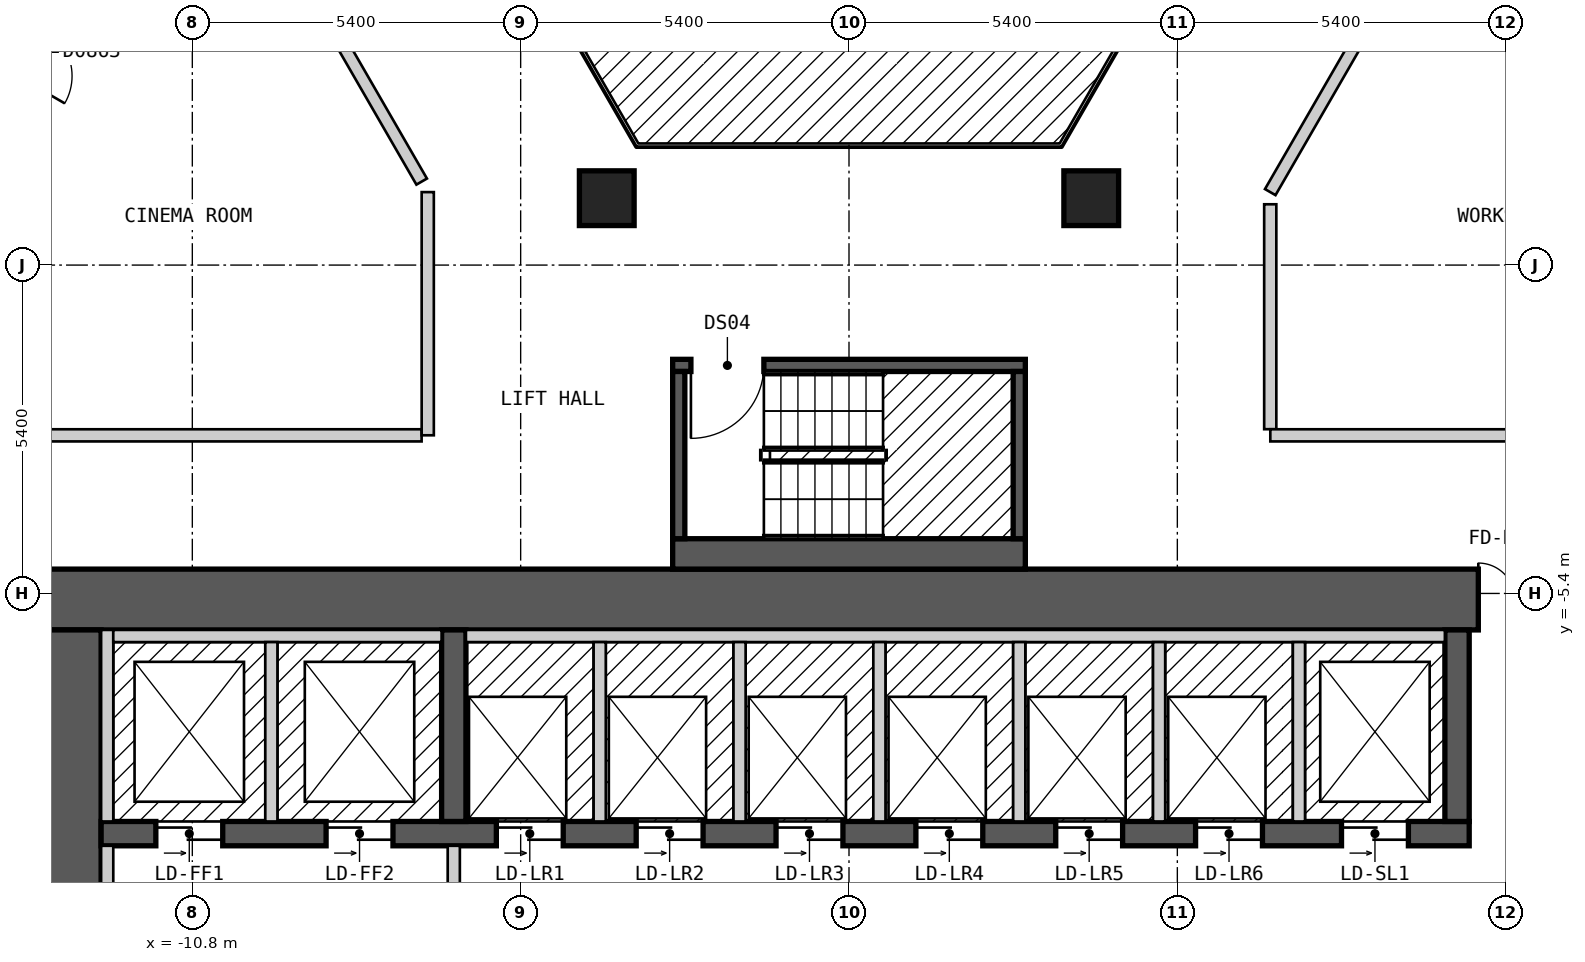
"""IFC4 building model, lengths in metres.
Left out: names, types, materials, properties, quantities, classifications, styles, units other than length and angle.
Written with IfcOpenShell. Run it as: python <this file> out.ifc"""

import sys

from ifc_helpers import new_model, si_unit, direction, frame, frame_2d, origin, origin_2d, place, context, subcontext, project, spatial, rectangle, extrude, element, fill, save


model = new_model("IFC4")
c1 = context("Model", 3, precision=1e-05, world=origin(), true_north=direction((0.0, 1.0)))
c2 = subcontext(c1, "Body", "Model", "MODEL_VIEW")
j1 = project(units=[si_unit("LENGTHUNIT", "METRE"), si_unit("PLANEANGLEUNIT", "RADIAN")], contexts=[c1])
p1 = place(None, origin())
s1 = spatial("IfcSite", under=j1, at=p1, CompositionType="ELEMENT")
p2 = place(p1, origin())
s2 = spatial("IfcBuilding", under=s1, at=p2, CompositionType="ELEMENT")
p3 = place(p2, frame((0.0, 0.0, 84.0)))
s3 = spatial("IfcBuildingStorey", under=s2, at=p3, CompositionType="ELEMENT", Elevation=84.0)
for number, where, z_axis, x_axis in (
    (1, (3.984, 1.1, 0.0), (0.0, 0.0, 1.0), (1.0, 0.0, 0.0)),
    (2, (-3.984, 1.1, 0.0), (0.0, 0.0, 1.0), (1.0, 0.0, 0.0)),
):
    element("IfcColumn", number, at=place(p3, frame(where, z_axis=z_axis, x_axis=x_axis)), inside=s3, PredefinedType="COLUMN", context=c2, shape_type="SweptSolid", body=[
        extrude(rectangle(XDim=0.9, YDim=0.9, at=origin_2d()), origin(), (0.0, 0.0, 1.0), 3.0),
    ])
p4 = place(p3, frame((-13.3, -5.5, 0.0), z_axis=(0.0, 0.0, 1.0), x_axis=(1.0, 0.0, 0.0)))
e3 = element("IfcWall", 3, at=p4, inside=s3, PredefinedType="SHEAR", context=c2, shape_type="SweptSolid", body=[
    extrude(rectangle(XDim=26.6, YDim=1.0, at=frame_2d((13.3, 0.0))), origin(), (0.0, 0.0, 1.0), 2.7),
])
p5 = place(p4, frame((23.65, 0.0, 0.0)))
e4 = element("IfcOpeningElement", 4, at=p5, cuts=e3, PredefinedType="OPENING", context=c2, shape_type="SweptSolid", body=[
    extrude(rectangle(XDim=1.2, YDim=2.1, at=frame_2d((0.6, 1.05))), frame((0.0, 0.51, 0.0), z_axis=(0.0, -1.0, 0.0), x_axis=(1.0, 0.0, 0.0)), (0.0, 0.0, 1.0), 1.02),
])
p6 = place(p3, frame((-12.8, -18.0, 0.0), z_axis=(0.0, 0.0, 1.0), x_axis=(0.0, 1.0, 0.0)))
e5 = element("IfcWall", 5, at=p6, inside=s3, PredefinedType="SHEAR", context=c2, shape_type="SweptSolid", body=[
    extrude(rectangle(XDim=12.0, YDim=1.0, at=frame_2d((6.0, 0.0))), origin(), (0.0, 0.0, 1.0), 2.7),
])
p7 = place(p6, frame((3.8, 0.0, 0.0)))
e6 = element("IfcOpeningElement", 6, at=p7, cuts=e5, PredefinedType="OPENING", context=c2, shape_type="SweptSolid", body=[
    extrude(rectangle(XDim=1.2, YDim=2.1, at=frame_2d((0.6, 1.05))), frame((0.0, 0.51, 0.0), z_axis=(0.0, -1.0, 0.0), x_axis=(1.0, 0.0, 0.0)), (0.0, 0.0, 1.0), 1.02),
])
p8 = place(p3, frame((-12.3, -9.35, 0.0), z_axis=(0.0, 0.0, 1.0), x_axis=(1.0, 0.0, 0.0)))
e7 = element("IfcWall", 7, at=p8, inside=s3, PredefinedType="SHEAR", context=c2, shape_type="SweptSolid", body=[
    extrude(rectangle(XDim=22.5, YDim=0.4, at=frame_2d((11.25, 0.0))), origin(), (0.0, 0.0, 1.0), 2.7),
])
p9 = place(p8, frame((0.9, 0.0, 0.0)))
e8 = element("IfcOpeningElement", 8, at=p9, cuts=e7, PredefinedType="OPENING", context=c2, shape_type="SweptSolid", body=[
    extrude(rectangle(XDim=1.1, YDim=2.1, at=frame_2d((0.55, 1.05))), frame((0.0, 0.21, 0.0), z_axis=(0.0, -1.0, 0.0), x_axis=(1.0, 0.0, 0.0)), (0.0, 0.0, 1.0), 0.42),
])
p10 = place(p8, frame((3.7, 0.0, 0.0)))
e9 = element("IfcOpeningElement", 9, at=p10, cuts=e7, PredefinedType="OPENING", context=c2, shape_type="SweptSolid", body=[
    extrude(rectangle(XDim=1.1, YDim=2.1, at=frame_2d((0.55, 1.05))), frame((0.0, 0.21, 0.0), z_axis=(0.0, -1.0, 0.0), x_axis=(1.0, 0.0, 0.0)), (0.0, 0.0, 1.0), 0.42),
])
p11 = place(p8, frame((6.5, 0.0, 0.0)))
e10 = element("IfcOpeningElement", 10, at=p11, cuts=e7, PredefinedType="OPENING", context=c2, shape_type="SweptSolid", body=[
    extrude(rectangle(XDim=1.1, YDim=2.1, at=frame_2d((0.55, 1.05))), frame((0.0, 0.21, 0.0), z_axis=(0.0, -1.0, 0.0), x_axis=(1.0, 0.0, 0.0)), (0.0, 0.0, 1.0), 0.42),
])
p12 = place(p8, frame((8.8, 0.0, 0.0)))
e11 = element("IfcOpeningElement", 11, at=p12, cuts=e7, PredefinedType="OPENING", context=c2, shape_type="SweptSolid", body=[
    extrude(rectangle(XDim=1.1, YDim=2.1, at=frame_2d((0.55, 1.05))), frame((0.0, 0.21, 0.0), z_axis=(0.0, -1.0, 0.0), x_axis=(1.0, 0.0, 0.0)), (0.0, 0.0, 1.0), 0.42),
])
p13 = place(p8, frame((11.1, 0.0, 0.0)))
e12 = element("IfcOpeningElement", 12, at=p13, cuts=e7, PredefinedType="OPENING", context=c2, shape_type="SweptSolid", body=[
    extrude(rectangle(XDim=1.1, YDim=2.1, at=frame_2d((0.55, 1.05))), frame((0.0, 0.21, 0.0), z_axis=(0.0, -1.0, 0.0), x_axis=(1.0, 0.0, 0.0)), (0.0, 0.0, 1.0), 0.42),
])
p14 = place(p8, frame((13.4, 0.0, 0.0)))
e13 = element("IfcOpeningElement", 13, at=p14, cuts=e7, PredefinedType="OPENING", context=c2, shape_type="SweptSolid", body=[
    extrude(rectangle(XDim=1.1, YDim=2.1, at=frame_2d((0.55, 1.05))), frame((0.0, 0.21, 0.0), z_axis=(0.0, -1.0, 0.0), x_axis=(1.0, 0.0, 0.0)), (0.0, 0.0, 1.0), 0.42),
])
p15 = place(p8, frame((15.7, 0.0, 0.0)))
e14 = element("IfcOpeningElement", 14, at=p15, cuts=e7, PredefinedType="OPENING", context=c2, shape_type="SweptSolid", body=[
    extrude(rectangle(XDim=1.1, YDim=2.1, at=frame_2d((0.55, 1.05))), frame((0.0, 0.21, 0.0), z_axis=(0.0, -1.0, 0.0), x_axis=(1.0, 0.0, 0.0)), (0.0, 0.0, 1.0), 0.42),
])
p16 = place(p8, frame((18.0, 0.0, 0.0)))
e15 = element("IfcOpeningElement", 15, at=p16, cuts=e7, PredefinedType="OPENING", context=c2, shape_type="SweptSolid", body=[
    extrude(rectangle(XDim=1.1, YDim=2.1, at=frame_2d((0.55, 1.05))), frame((0.0, 0.21, 0.0), z_axis=(0.0, -1.0, 0.0), x_axis=(1.0, 0.0, 0.0)), (0.0, 0.0, 1.0), 0.42),
])
p17 = place(p8, frame((20.4, 0.0, 0.0)))
e16 = element("IfcOpeningElement", 16, at=p17, cuts=e7, PredefinedType="OPENING", context=c2, shape_type="SweptSolid", body=[
    extrude(rectangle(XDim=1.1, YDim=2.1, at=frame_2d((0.55, 1.05))), frame((0.0, 0.21, 0.0), z_axis=(0.0, -1.0, 0.0), x_axis=(1.0, 0.0, 0.0)), (0.0, 0.0, 1.0), 0.42),
])
for number, where, z_axis, x_axis in (
    (17, (-6.5, -9.15, 0.0), (0.0, 0.0, 1.0), (0.0, 1.0, 0.0)),
    (18, (10.0, -9.15, 0.0), (0.0, 0.0, 1.0), (0.0, 1.0, 0.0)),
):
    element("IfcWall", number, at=place(p3, frame(where, z_axis=z_axis, x_axis=x_axis)), inside=s3, PredefinedType="SHEAR", context=c2, shape_type="SweptSolid", body=[
        extrude(rectangle(XDim=3.15, YDim=0.4, at=frame_2d((1.575, 0.0))), origin(), (0.0, 0.0, 1.0), 2.7),
    ])
p18 = place(p3, frame((-2.9, -4.75, 0.0), z_axis=(0.0, 0.0, 1.0), x_axis=(1.0, 0.0, 0.0)))
e19 = element("IfcWall", 19, at=p18, inside=s3, PredefinedType="SOLIDWALL", context=c2, shape_type="SweptSolid", body=[
    extrude(rectangle(XDim=5.8, YDim=0.5, at=frame_2d((2.9, 0.0))), origin(), (0.0, 0.0, 1.0), 2.7),
])
p19 = place(p3, frame((-2.9, -1.65, 0.0), z_axis=(0.0, 0.0, 1.0), x_axis=(1.0, 0.0, 0.0)))
e20 = element("IfcWall", 20, at=p19, inside=s3, PredefinedType="SOLIDWALL", context=c2, shape_type="SweptSolid", body=[
    extrude(rectangle(XDim=5.8, YDim=0.2, at=frame_2d((2.9, 0.0))), origin(), (0.0, 0.0, 1.0), 2.7),
])
p20 = place(p19, frame((0.3, 0.0, 0.0)))
e21 = element("IfcOpeningElement", 21, at=p20, cuts=e20, PredefinedType="OPENING", context=c2, shape_type="SweptSolid", body=[
    extrude(rectangle(XDim=1.2, YDim=2.1, at=frame_2d((0.6, 1.05))), frame((0.0, 0.11, 0.0), z_axis=(0.0, -1.0, 0.0), x_axis=(1.0, 0.0, 0.0)), (0.0, 0.0, 1.0), 0.22),
])
for number, where, z_axis, x_axis in (
    (22, (-2.8, -4.5, 0.0), (0.0, 0.0, 1.0), (0.0, 1.0, 0.0)),
    (23, (2.8, -4.5, 0.0), (0.0, 0.0, 1.0), (0.0, 1.0, 0.0)),
):
    element("IfcWall", number, at=place(p3, frame(where, z_axis=z_axis, x_axis=x_axis)), inside=s3, PredefinedType="SOLIDWALL", context=c2, shape_type="SweptSolid", body=[
        extrude(rectangle(XDim=2.75, YDim=0.2, at=frame_2d((1.375, 0.0))), origin(), (0.0, 0.0, 1.0), 2.7),
    ])
p21 = place(p3, frame((-10.796, 7.899, 0.0), z_axis=(0.0, 0.0, 1.0), x_axis=(0.500010383074, -0.866019409031, 0.0)))
e24 = element("IfcWall", 24, at=p21, inside=s3, PredefinedType="PARTITIONING", context=c2, shape_type="SweptSolid", body=[
    extrude(rectangle(XDim=7.535, YDim=0.2, at=frame_2d((3.768, 0.0))), origin(), (0.0, 0.0, 1.0), 2.7),
])
p22 = place(p3, frame((8.488, 16.5, 0.0), z_axis=(0.0, 0.0, 1.0), x_axis=(0.499986836607, -0.86603300354, 0.0)))
e25 = element("IfcWall", 25, at=p22, inside=s3, PredefinedType="PARTITIONING", context=c2, shape_type="SweptSolid", body=[
    extrude(rectangle(XDim=20.09, YDim=0.2, at=frame_2d((10.045, 0.0))), origin(), (0.0, 0.0, 1.0), 2.7),
])
p23 = place(p22, frame((4.523, 0.0, 0.0)))
e26 = element("IfcOpeningElement", 26, at=p23, cuts=e25, PredefinedType="OPENING", context=c2, shape_type="SweptSolid", body=[
    extrude(rectangle(XDim=1.0, YDim=2.1, at=frame_2d((0.5, 1.05))), frame((0.0, 0.11, 0.0), z_axis=(0.0, -1.0, 0.0), x_axis=(1.0, 0.0, 0.0)), (0.0, 0.0, 1.0), 0.22),
])
p24 = place(p3, frame((6.928, 1.0, 0.0), z_axis=(0.0, 0.0, 1.0), x_axis=(0.0, -1.0, 0.0)))
e27 = element("IfcWall", 27, at=p24, inside=s3, PredefinedType="PARTITIONING", context=c2, shape_type="SweptSolid", body=[
    extrude(rectangle(XDim=3.699, YDim=0.2, at=frame_2d((1.85, 0.0))), origin(), (0.0, 0.0, 1.0), 2.7),
])
p25 = place(p3, frame((-15.011, -2.8, 0.0), z_axis=(0.0, 0.0, 1.0), x_axis=(1.0, 0.0, 0.0)))
e28 = element("IfcWall", 28, at=p25, inside=s3, PredefinedType="PARTITIONING", context=c2, shape_type="SweptSolid", body=[
    extrude(rectangle(XDim=7.982, YDim=0.2, at=frame_2d((3.991, 0.0))), origin(), (0.0, 0.0, 1.0), 2.7),
])
p26 = place(p3, frame((6.929, -2.8, 0.0), z_axis=(0.0, 0.0, 1.0), x_axis=(1.0, 0.0, 0.0)))
e29 = element("IfcWall", 29, at=p26, inside=s3, PredefinedType="PARTITIONING", context=c2, shape_type="SweptSolid", body=[
    extrude(rectangle(XDim=7.966, YDim=0.2, at=frame_2d((3.983, 0.0))), origin(), (0.0, 0.0, 1.0), 2.7),
])
p27 = place(p3, frame((6.928, 1.2, 0.0), z_axis=(0.0, 0.0, 1.0), x_axis=(0.500055327065, 0.865993458332, 0.0)))
e30 = element("IfcWall", 30, at=p27, inside=s3, PredefinedType="PARTITIONING", context=c2, shape_type="SweptSolid", body=[
    extrude(rectangle(XDim=7.851, YDim=0.2, at=frame_2d((3.926, 0.0))), origin(), (0.0, 0.0, 1.0), 2.7),
])
p28 = place(p3, frame((-16.05, -1.0, 0.0), z_axis=(0.0, 0.0, 1.0), x_axis=(0.499962449088, 0.866047082728, 0.0)))
e31 = element("IfcWall", 31, at=p28, inside=s3, PredefinedType="PARTITIONING", context=c2, shape_type="SweptSolid", body=[
    extrude(rectangle(XDim=10.391, YDim=0.2, at=frame_2d((5.195, 0.0))), origin(), (0.0, 0.0, 1.0), 2.7),
])
p29 = place(p28, frame((4.745, 0.0, 0.0)))
e32 = element("IfcOpeningElement", 32, at=p29, cuts=e31, PredefinedType="OPENING", context=c2, shape_type="SweptSolid", body=[
    extrude(rectangle(XDim=0.9, YDim=2.1, at=frame_2d((0.45, 1.05))), frame((0.0, 0.11, 0.0), z_axis=(0.0, -1.0, 0.0), x_axis=(1.0, 0.0, 0.0)), (0.0, 0.0, 1.0), 0.22),
])
p30 = place(p3, frame((-18.562, -0.951, 0.0), z_axis=(0.0, 0.0, 1.0), x_axis=(0.499992962407, 0.866029466902, 0.0)))
e33 = element("IfcWall", 33, at=p30, inside=s3, PredefinedType="PARTITIONING", context=c2, shape_type="SweptSolid", body=[
    extrude(rectangle(XDim=20.208, YDim=0.2, at=frame_2d((10.104, 0.0))), origin(), (0.0, 0.0, 1.0), 2.7),
])
p31 = place(p30, frame((14.627, 0.0, 0.0)))
e34 = element("IfcOpeningElement", 34, at=p31, cuts=e33, PredefinedType="OPENING", context=c2, shape_type="SweptSolid", body=[
    extrude(rectangle(XDim=1.0, YDim=2.1, at=frame_2d((0.5, 1.05))), frame((0.0, 0.11, 0.0), z_axis=(0.0, -1.0, 0.0), x_axis=(1.0, 0.0, 0.0)), (0.0, 0.0, 1.0), 0.22),
])
p32 = place(p30, frame((4.581, 0.0, 0.0)))
e35 = element("IfcOpeningElement", 35, at=p32, cuts=e33, PredefinedType="OPENING", context=c2, shape_type="SweptSolid", body=[
    extrude(rectangle(XDim=1.0, YDim=2.1, at=frame_2d((0.5, 1.05))), frame((0.0, 0.11, 0.0), z_axis=(0.0, -1.0, 0.0), x_axis=(1.0, 0.0, 0.0)), (0.0, 0.0, 1.0), 0.22),
])
p33 = place(p3, frame((-6.928, -2.799, 0.0), z_axis=(0.0, 0.0, 1.0), x_axis=(0.0, 1.0, 0.0)))
e36 = element("IfcWall", 36, at=p33, inside=s3, PredefinedType="PARTITIONING", context=c2, shape_type="SweptSolid", body=[
    extrude(rectangle(XDim=3.999, YDim=0.2, at=frame_2d((2.0, 0.0))), origin(), (0.0, 0.0, 1.0), 2.7),
])
p34 = place(p3, frame((-12.2, -13.0, 0.0), z_axis=(0.0, 0.0, 1.0), x_axis=(0.0, 1.0, 0.0)))
e37 = element("IfcWall", 37, at=p34, inside=s3, PredefinedType="PARTITIONING", context=c2, shape_type="SweptSolid", body=[
    extrude(rectangle(XDim=3.45, YDim=0.2, at=frame_2d((1.725, 0.0))), origin(), (0.0, 0.0, 1.0), 2.7),
])
p35 = place(p3, frame((-12.2, -9.15, 0.0), z_axis=(0.0, 0.0, 1.0), x_axis=(0.0, 1.0, 0.0)))
e38 = element("IfcWall", 38, at=p35, inside=s3, PredefinedType="SOLIDWALL", context=c2, shape_type="SweptSolid", body=[
    extrude(rectangle(XDim=3.15, YDim=0.2, at=frame_2d((1.575, 0.0))), origin(), (0.0, 0.0, 1.0), 2.7),
])
p36 = place(p3, frame((-12.1, -6.1, 0.0), z_axis=(0.0, 0.0, 1.0), x_axis=(1.0, 0.0, 0.0)))
e39 = element("IfcWall", 39, at=p36, inside=s3, PredefinedType="SOLIDWALL", context=c2, shape_type="SweptSolid", body=[
    extrude(rectangle(XDim=5.4, YDim=0.2, at=frame_2d((2.7, 0.0))), origin(), (0.0, 0.0, 1.0), 2.7),
])
p37 = place(p3, frame((-9.5, -9.15, 0.0), z_axis=(0.0, 0.0, 1.0), x_axis=(0.0, 1.0, 0.0)))
e40 = element("IfcWall", 40, at=p37, inside=s3, PredefinedType="SOLIDWALL", context=c2, shape_type="SweptSolid", body=[
    extrude(rectangle(XDim=2.95, YDim=0.2, at=frame_2d((1.475, 0.0))), origin(), (0.0, 0.0, 1.0), 2.7),
])
p38 = place(p3, frame((-6.5, -14.45, 0.0), z_axis=(0.0, 0.0, 1.0), x_axis=(0.0, 1.0, 0.0)))
e41 = element("IfcWall", 41, at=p38, inside=s3, PredefinedType="PARTITIONING", context=c2, shape_type="SweptSolid", body=[
    extrude(rectangle(XDim=4.9, YDim=0.2, at=frame_2d((2.45, 0.0))), origin(), (0.0, 0.0, 1.0), 2.7),
])
p39 = place(p38, frame((3.15, 0.0, 0.0), z_axis=(0.0, 0.0, 1.0), x_axis=(-1.0, 0.0, 0.0)))
e42 = element("IfcOpeningElement", 42, at=p39, cuts=e41, PredefinedType="OPENING", context=c2, shape_type="SweptSolid", body=[
    extrude(rectangle(XDim=1.4, YDim=2.1, at=frame_2d((0.7, 1.05))), frame((0.0, 0.11, 0.0), z_axis=(0.0, -1.0, 0.0), x_axis=(1.0, 0.0, 0.0)), (0.0, 0.0, 1.0), 0.22),
])
p40 = place(p3, frame((-6.3, -6.1, 0.0), z_axis=(0.0, 0.0, 1.0), x_axis=(1.0, 0.0, 0.0)))
e43 = element("IfcWall", 43, at=p40, inside=s3, PredefinedType="SOLIDWALL", context=c2, shape_type="SweptSolid", body=[
    extrude(rectangle(XDim=16.1, YDim=0.2, at=frame_2d((8.05, 0.0))), origin(), (0.0, 0.0, 1.0), 2.7),
])
for number, where, z_axis, x_axis in (
    (44, (-4.1, -9.15, 0.0), (0.0, 0.0, 1.0), (0.0, 1.0, 0.0)),
    (45, (-1.8, -9.15, 0.0), (0.0, 0.0, 1.0), (0.0, 1.0, 0.0)),
    (46, (0.5, -9.15, 0.0), (0.0, 0.0, 1.0), (0.0, 1.0, 0.0)),
    (47, (2.8, -9.15, 0.0), (0.0, 0.0, 1.0), (0.0, 1.0, 0.0)),
    (48, (5.1, -9.15, 0.0), (0.0, 0.0, 1.0), (0.0, 1.0, 0.0)),
    (49, (7.4, -9.15, 0.0), (0.0, 0.0, 1.0), (0.0, 1.0, 0.0)),
):
    element("IfcWall", number, at=place(p3, frame(where, z_axis=z_axis, x_axis=x_axis)), inside=s3, PredefinedType="SOLIDWALL", context=c2, shape_type="SweptSolid", body=[
        extrude(rectangle(XDim=2.95, YDim=0.2, at=frame_2d((1.475, 0.0))), origin(), (0.0, 0.0, 1.0), 2.7),
    ])
p41 = place(p20, origin())
e50 = element("IfcDoor", 50, at=p41, inside=s3, OperationType="SINGLE_SWING_LEFT", PredefinedType="DOOR", context=c2, shape_type="SweptSolid", body=[
    extrude(rectangle(XDim=1.2, YDim=2.1, at=frame_2d((0.6, 1.05))), frame((0.0, 0.025, 0.0), z_axis=(0.0, -1.0, 0.0), x_axis=(1.0, 0.0, 0.0)), (0.0, 0.0, 1.0), 0.05),
])
fill(e21, e50)
p42 = place(p9, origin())
e51 = element("IfcDoor", 51, at=p42, inside=s3, OperationType="DOUBLE_DOOR_SLIDING", PredefinedType="DOOR", context=c2, shape_type="SweptSolid", body=[
    extrude(rectangle(XDim=1.1, YDim=2.1, at=frame_2d((0.55, 1.05))), frame((0.0, 0.025, 0.0), z_axis=(0.0, -1.0, 0.0), x_axis=(1.0, 0.0, 0.0)), (0.0, 0.0, 1.0), 0.05),
])
fill(e8, e51)
p43 = place(p10, origin())
e52 = element("IfcDoor", 52, at=p43, inside=s3, OperationType="DOUBLE_DOOR_SLIDING", PredefinedType="DOOR", context=c2, shape_type="SweptSolid", body=[
    extrude(rectangle(XDim=1.1, YDim=2.1, at=frame_2d((0.55, 1.05))), frame((0.0, 0.025, 0.0), z_axis=(0.0, -1.0, 0.0), x_axis=(1.0, 0.0, 0.0)), (0.0, 0.0, 1.0), 0.05),
])
fill(e9, e52)
p44 = place(p11, origin())
e53 = element("IfcDoor", 53, at=p44, inside=s3, OperationType="DOUBLE_DOOR_SLIDING", PredefinedType="DOOR", context=c2, shape_type="SweptSolid", body=[
    extrude(rectangle(XDim=1.1, YDim=2.1, at=frame_2d((0.55, 1.05))), frame((0.0, 0.025, 0.0), z_axis=(0.0, -1.0, 0.0), x_axis=(1.0, 0.0, 0.0)), (0.0, 0.0, 1.0), 0.05),
])
fill(e10, e53)
p45 = place(p12, origin())
e54 = element("IfcDoor", 54, at=p45, inside=s3, OperationType="DOUBLE_DOOR_SLIDING", PredefinedType="DOOR", context=c2, shape_type="SweptSolid", body=[
    extrude(rectangle(XDim=1.1, YDim=2.1, at=frame_2d((0.55, 1.05))), frame((0.0, 0.025, 0.0), z_axis=(0.0, -1.0, 0.0), x_axis=(1.0, 0.0, 0.0)), (0.0, 0.0, 1.0), 0.05),
])
fill(e11, e54)
p46 = place(p13, origin())
e55 = element("IfcDoor", 55, at=p46, inside=s3, OperationType="DOUBLE_DOOR_SLIDING", PredefinedType="DOOR", context=c2, shape_type="SweptSolid", body=[
    extrude(rectangle(XDim=1.1, YDim=2.1, at=frame_2d((0.55, 1.05))), frame((0.0, 0.025, 0.0), z_axis=(0.0, -1.0, 0.0), x_axis=(1.0, 0.0, 0.0)), (0.0, 0.0, 1.0), 0.05),
])
fill(e12, e55)
p47 = place(p14, origin())
e56 = element("IfcDoor", 56, at=p47, inside=s3, OperationType="DOUBLE_DOOR_SLIDING", PredefinedType="DOOR", context=c2, shape_type="SweptSolid", body=[
    extrude(rectangle(XDim=1.1, YDim=2.1, at=frame_2d((0.55, 1.05))), frame((0.0, 0.025, 0.0), z_axis=(0.0, -1.0, 0.0), x_axis=(1.0, 0.0, 0.0)), (0.0, 0.0, 1.0), 0.05),
])
fill(e13, e56)
p48 = place(p15, origin())
e57 = element("IfcDoor", 57, at=p48, inside=s3, OperationType="DOUBLE_DOOR_SLIDING", PredefinedType="DOOR", context=c2, shape_type="SweptSolid", body=[
    extrude(rectangle(XDim=1.1, YDim=2.1, at=frame_2d((0.55, 1.05))), frame((0.0, 0.025, 0.0), z_axis=(0.0, -1.0, 0.0), x_axis=(1.0, 0.0, 0.0)), (0.0, 0.0, 1.0), 0.05),
])
fill(e14, e57)
p49 = place(p16, origin())
e58 = element("IfcDoor", 58, at=p49, inside=s3, OperationType="DOUBLE_DOOR_SLIDING", PredefinedType="DOOR", context=c2, shape_type="SweptSolid", body=[
    extrude(rectangle(XDim=1.1, YDim=2.1, at=frame_2d((0.55, 1.05))), frame((0.0, 0.025, 0.0), z_axis=(0.0, -1.0, 0.0), x_axis=(1.0, 0.0, 0.0)), (0.0, 0.0, 1.0), 0.05),
])
fill(e15, e58)
p50 = place(p17, origin())
e59 = element("IfcDoor", 59, at=p50, inside=s3, OperationType="DOUBLE_DOOR_SLIDING", PredefinedType="DOOR", context=c2, shape_type="SweptSolid", body=[
    extrude(rectangle(XDim=1.1, YDim=2.1, at=frame_2d((0.55, 1.05))), frame((0.0, 0.025, 0.0), z_axis=(0.0, -1.0, 0.0), x_axis=(1.0, 0.0, 0.0)), (0.0, 0.0, 1.0), 0.05),
])
fill(e16, e59)
p51 = place(p5, origin())
e60 = element("IfcDoor", 60, at=p51, inside=s3, OperationType="DOUBLE_DOOR_SINGLE_SWING", PredefinedType="DOOR", context=c2, shape_type="SweptSolid", body=[
    extrude(rectangle(XDim=1.2, YDim=2.1, at=frame_2d((0.6, 1.05))), frame((0.0, 0.025, 0.0), z_axis=(0.0, -1.0, 0.0), x_axis=(1.0, 0.0, 0.0)), (0.0, 0.0, 1.0), 0.05),
])
fill(e4, e60)
save(model, sys.argv[1])
